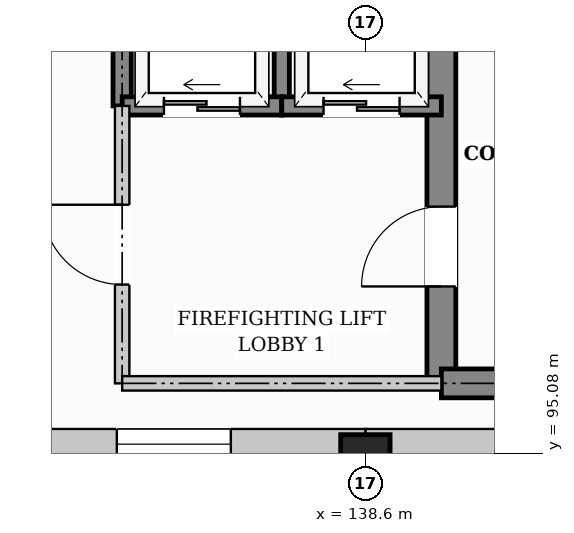
"""IFC4 building model, lengths in metres.
Left out: names, types, materials, properties, quantities, classifications, styles, units other than length and angle.
Written with IfcOpenShell. Run it as: python <this file> out.ifc"""

import sys

from ifc_helpers import new_model, si_unit, direction, frame, frame_2d, origin, origin_2d, place, context, subcontext, project, spatial, rectangle, extrude, element, fill, save


model = new_model("IFC4")
c1 = context("Model", 3, precision=1e-05, world=origin(), true_north=direction((0.0, 1.0)))
c2 = subcontext(c1, "Body", "Model", "MODEL_VIEW")
j1 = project(units=[si_unit("LENGTHUNIT", "METRE"), si_unit("PLANEANGLEUNIT", "RADIAN")], contexts=[c1])
p1 = place(None, origin())
s1 = spatial("IfcSite", under=j1, at=p1, CompositionType="ELEMENT")
p2 = place(p1, origin())
s2 = spatial("IfcBuilding", under=s1, at=p2, CompositionType="ELEMENT")
p3 = place(p2, frame((0.0, 0.0, 20.4)))
s3 = spatial("IfcBuildingStorey", under=s2, at=p3, CompositionType="ELEMENT", Elevation=20.4)
p4 = place(p3, frame((138.6, 95.0, 0.0), z_axis=(0.0, 0.0, 1.0), x_axis=(1.0, 0.0, 0.0)))
e1 = element("IfcColumn", 1, at=p4, inside=s3, PredefinedType="COLUMN", context=c2, shape_type="SweptSolid", body=[
    extrude(rectangle(XDim=0.65, YDim=0.65, at=origin_2d()), origin(), (0.0, 0.0, 1.0), 3.6),
])
p5 = place(p3, frame((147.6, 95.2, 0.0), z_axis=(0.0, 0.0, 1.0), x_axis=(-1.0, 0.0, 0.0)))
e2 = element("IfcWall", 2, at=p5, inside=s3, PredefinedType="SOLIDWALL", context=c2, shape_type="SweptSolid", body=[
    extrude(rectangle(XDim=9.0, YDim=0.4, at=frame_2d((4.5, 0.0))), origin(), (0.0, 0.0, 1.0), 2.59),
])
p6 = place(p5, frame((1.77, 0.0, 0.75)))
e3 = element("IfcOpeningElement", 3, at=p6, cuts=e2, PredefinedType="OPENING", context=c2, shape_type="SweptSolid", body=[
    extrude(rectangle(XDim=1.5, YDim=1.6, at=frame_2d((0.75, 0.8))), frame((0.0, 0.21, 0.0), z_axis=(0.0, -1.0, 0.0), x_axis=(1.0, 0.0, 0.0)), (0.0, 0.0, 1.0), 0.42),
])
p7 = place(p5, frame((5.73, 0.0, 0.75)))
e4 = element("IfcOpeningElement", 4, at=p7, cuts=e2, PredefinedType="OPENING", context=c2, shape_type="SweptSolid", body=[
    extrude(rectangle(XDim=1.5, YDim=1.6, at=frame_2d((0.75, 0.8))), frame((0.0, 0.21, 0.0), z_axis=(0.0, -1.0, 0.0), x_axis=(1.0, 0.0, 0.0)), (0.0, 0.0, 1.0), 0.42),
])
p8 = place(p3, frame((138.6, 95.2, 0.0), z_axis=(0.0, 0.0, 1.0), x_axis=(-1.0, 0.0, 0.0)))
e5 = element("IfcWall", 5, at=p8, inside=s3, PredefinedType="SOLIDWALL", context=c2, shape_type="SweptSolid", body=[
    extrude(rectangle(XDim=9.0, YDim=0.4, at=frame_2d((4.5, 0.0))), origin(), (0.0, 0.0, 1.0), 2.66),
])
p9 = place(p8, frame((1.77, 0.0, 0.75)))
e6 = element("IfcOpeningElement", 6, at=p9, cuts=e5, PredefinedType="OPENING", context=c2, shape_type="SweptSolid", body=[
    extrude(rectangle(XDim=1.5, YDim=1.6, at=frame_2d((0.75, 0.8))), frame((0.0, 0.21, 0.0), z_axis=(0.0, -1.0, 0.0), x_axis=(1.0, 0.0, 0.0)), (0.0, 0.0, 1.0), 0.42),
])
p10 = place(p8, frame((5.73, 0.0, 0.75)))
e7 = element("IfcOpeningElement", 7, at=p10, cuts=e5, PredefinedType="OPENING", context=c2, shape_type="SweptSolid", body=[
    extrude(rectangle(XDim=1.5, YDim=1.6, at=frame_2d((0.75, 0.8))), frame((0.0, 0.21, 0.0), z_axis=(0.0, -1.0, 0.0), x_axis=(1.0, 0.0, 0.0)), (0.0, 0.0, 1.0), 0.42),
])
p11 = place(p3, frame((139.6, 96.0, 0.0), z_axis=(0.0, 0.0, 1.0), x_axis=(0.0, 1.0, 0.0)))
e8 = element("IfcWall", 8, at=p11, inside=s3, PredefinedType="SHEAR", context=c2, shape_type="SweptSolid", body=[
    extrude(rectangle(XDim=6.0, YDim=0.38, at=frame_2d((3.0, 0.0))), origin(), (0.0, 0.0, 1.0), 3.34),
])
p12 = place(p11, frame((1.275, 0.0, 0.0)))
e9 = element("IfcOpeningElement", 9, at=p12, cuts=e8, PredefinedType="OPENING", context=c2, shape_type="SweptSolid", body=[
    extrude(rectangle(XDim=1.05, YDim=2.15, at=frame_2d((0.525, 1.075))), frame((0.0, 0.2, 0.0), z_axis=(0.0, -1.0, 0.0), x_axis=(1.0, 0.0, 0.0)), (0.0, 0.0, 1.0), 0.4),
])
p13 = place(p3, frame((139.6, 96.0, 0.0), z_axis=(0.0, 0.0, 1.0), x_axis=(1.0, 0.0, 0.0)))
e10 = element("IfcWall", 10, at=p13, inside=s3, PredefinedType="SHEAR", context=c2, shape_type="SweptSolid", body=[
    extrude(rectangle(XDim=7.0, YDim=0.38, at=frame_2d((3.5, 0.0))), origin(), (0.0, 0.0, 1.0), 3.34),
])
p14 = place(p3, frame((135.4, 99.65, 0.0), z_axis=(0.0, 0.0, 1.0), x_axis=(0.0, 1.0, 0.0)))
e11 = element("IfcWall", 11, at=p14, inside=s3, PredefinedType="SHEAR", context=c2, shape_type="SweptSolid", body=[
    extrude(rectangle(XDim=2.35, YDim=0.24, at=frame_2d((1.175, 0.0))), origin(), (0.0, 0.0, 1.0), 3.34),
])
p15 = place(p3, frame((137.5, 99.65, 0.0), z_axis=(0.0, 0.0, 1.0), x_axis=(0.0, 1.0, 0.0)))
e12 = element("IfcWall", 12, at=p15, inside=s3, PredefinedType="SHEAR", context=c2, shape_type="SweptSolid", body=[
    extrude(rectangle(XDim=2.35, YDim=0.2, at=frame_2d((1.175, 0.0))), origin(), (0.0, 0.0, 1.0), 3.34),
])
p16 = place(p3, frame((135.4, 99.65, 0.0), z_axis=(0.0, 0.0, 1.0), x_axis=(1.0, 0.0, 0.0)))
e13 = element("IfcWall", 13, at=p16, inside=s3, PredefinedType="SHEAR", context=c2, shape_type="SweptSolid", body=[
    extrude(rectangle(XDim=2.1, YDim=0.24, at=frame_2d((1.05, 0.0))), origin(), (0.0, 0.0, 1.0), 3.34),
])
p17 = place(p16, frame((0.55, 0.0, 0.0)))
e14 = element("IfcOpeningElement", 14, at=p17, cuts=e13, PredefinedType="OPENING", context=c2, shape_type="SweptSolid", body=[
    extrude(rectangle(XDim=1.0, YDim=2.1, at=frame_2d((0.5, 1.05))), frame((0.0, 0.13, 0.0), z_axis=(0.0, -1.0, 0.0), x_axis=(1.0, 0.0, 0.0)), (0.0, 0.0, 1.0), 0.26),
])
p18 = place(p3, frame((137.5, 99.65, 0.0), z_axis=(0.0, 0.0, 1.0), x_axis=(1.0, 0.0, 0.0)))
e15 = element("IfcWall", 15, at=p18, inside=s3, PredefinedType="SHEAR", context=c2, shape_type="SweptSolid", body=[
    extrude(rectangle(XDim=2.1, YDim=0.24, at=frame_2d((1.05, 0.0))), origin(), (0.0, 0.0, 1.0), 3.34),
])
p19 = place(p18, frame((0.55, 0.0, 0.0)))
e16 = element("IfcOpeningElement", 16, at=p19, cuts=e15, PredefinedType="OPENING", context=c2, shape_type="SweptSolid", body=[
    extrude(rectangle(XDim=1.0, YDim=2.1, at=frame_2d((0.5, 1.05))), frame((0.0, 0.13, 0.0), z_axis=(0.0, -1.0, 0.0), x_axis=(1.0, 0.0, 0.0)), (0.0, 0.0, 1.0), 0.26),
])
p20 = place(p3, frame((135.4, 96.0, 0.0), z_axis=(0.0, 0.0, 1.0), x_axis=(0.0, 1.0, 0.0)))
e17 = element("IfcWall", 17, at=p20, inside=s3, PredefinedType="PARTITIONING", context=c2, shape_type="SweptSolid", body=[
    extrude(rectangle(XDim=3.65, YDim=0.19, at=frame_2d((1.825, 0.0))), origin(), (0.0, 0.0, 1.0), 3.34),
])
p21 = place(p20, frame((1.3, 0.0, 0.0)))
e18 = element("IfcOpeningElement", 18, at=p21, cuts=e17, PredefinedType="OPENING", context=c2, shape_type="SweptSolid", body=[
    extrude(rectangle(XDim=1.05, YDim=2.15, at=frame_2d((0.525, 1.075))), frame((0.0, 0.105, 0.0), z_axis=(0.0, -1.0, 0.0), x_axis=(1.0, 0.0, 0.0)), (0.0, 0.0, 1.0), 0.21),
])
p22 = place(p3, frame((135.4, 96.0, 0.0), z_axis=(0.0, 0.0, 1.0), x_axis=(1.0, 0.0, 0.0)))
e19 = element("IfcWall", 19, at=p22, inside=s3, PredefinedType="PARTITIONING", context=c2, shape_type="SweptSolid", body=[
    extrude(rectangle(XDim=4.2, YDim=0.19, at=frame_2d((2.1, 0.0))), origin(), (0.0, 0.0, 1.0), 3.34),
])
p23 = place(p9, origin())
e20 = element("IfcWindow", 20, at=p23, inside=s3, PartitioningType="DOUBLE_PANEL_HORIZONTAL", PredefinedType="WINDOW", context=c2, shape_type="SweptSolid", body=[
    extrude(rectangle(XDim=1.5, YDim=1.6, at=frame_2d((0.75, 0.8))), frame((0.0, 0.03, 0.0), z_axis=(0.0, -1.0, 0.0), x_axis=(1.0, 0.0, 0.0)), (0.0, 0.0, 1.0), 0.06),
])
fill(e6, e20)
p24 = place(p12, origin())
e21 = element("IfcDoor", 21, at=p24, inside=s3, OperationType="SINGLE_SWING_LEFT", PredefinedType="DOOR", context=c2, shape_type="SweptSolid", body=[
    extrude(rectangle(XDim=1.05, YDim=2.15, at=frame_2d((0.525, 1.075))), frame((0.0, 0.025, 0.0), z_axis=(0.0, -1.0, 0.0), x_axis=(1.0, 0.0, 0.0)), (0.0, 0.0, 1.0), 0.05),
])
fill(e9, e21)
p25 = place(p17, origin())
e22 = element("IfcDoor", 22, at=p25, inside=s3, OperationType="SLIDING_TO_LEFT", PredefinedType="DOOR", context=c2, shape_type="SweptSolid", body=[
    extrude(rectangle(XDim=1.0, YDim=2.1, at=frame_2d((0.5, 1.05))), frame((0.0, 0.025, 0.0), z_axis=(0.0, -1.0, 0.0), x_axis=(1.0, 0.0, 0.0)), (0.0, 0.0, 1.0), 0.05),
])
fill(e14, e22)
p26 = place(p19, origin())
e23 = element("IfcDoor", 23, at=p26, inside=s3, OperationType="SLIDING_TO_LEFT", PredefinedType="DOOR", context=c2, shape_type="SweptSolid", body=[
    extrude(rectangle(XDim=1.0, YDim=2.1, at=frame_2d((0.5, 1.05))), frame((0.0, 0.025, 0.0), z_axis=(0.0, -1.0, 0.0), x_axis=(1.0, 0.0, 0.0)), (0.0, 0.0, 1.0), 0.05),
])
fill(e16, e23)
p27 = place(p21, origin())
e24 = element("IfcDoor", 24, at=p27, inside=s3, OperationType="SINGLE_SWING_RIGHT", PredefinedType="DOOR", context=c2, shape_type="SweptSolid", body=[
    extrude(rectangle(XDim=1.05, YDim=2.15, at=frame_2d((0.525, 1.075))), frame((0.0, 0.025, 0.0), z_axis=(0.0, -1.0, 0.0), x_axis=(1.0, 0.0, 0.0)), (0.0, 0.0, 1.0), 0.05),
])
fill(e18, e24)
save(model, sys.argv[1])
